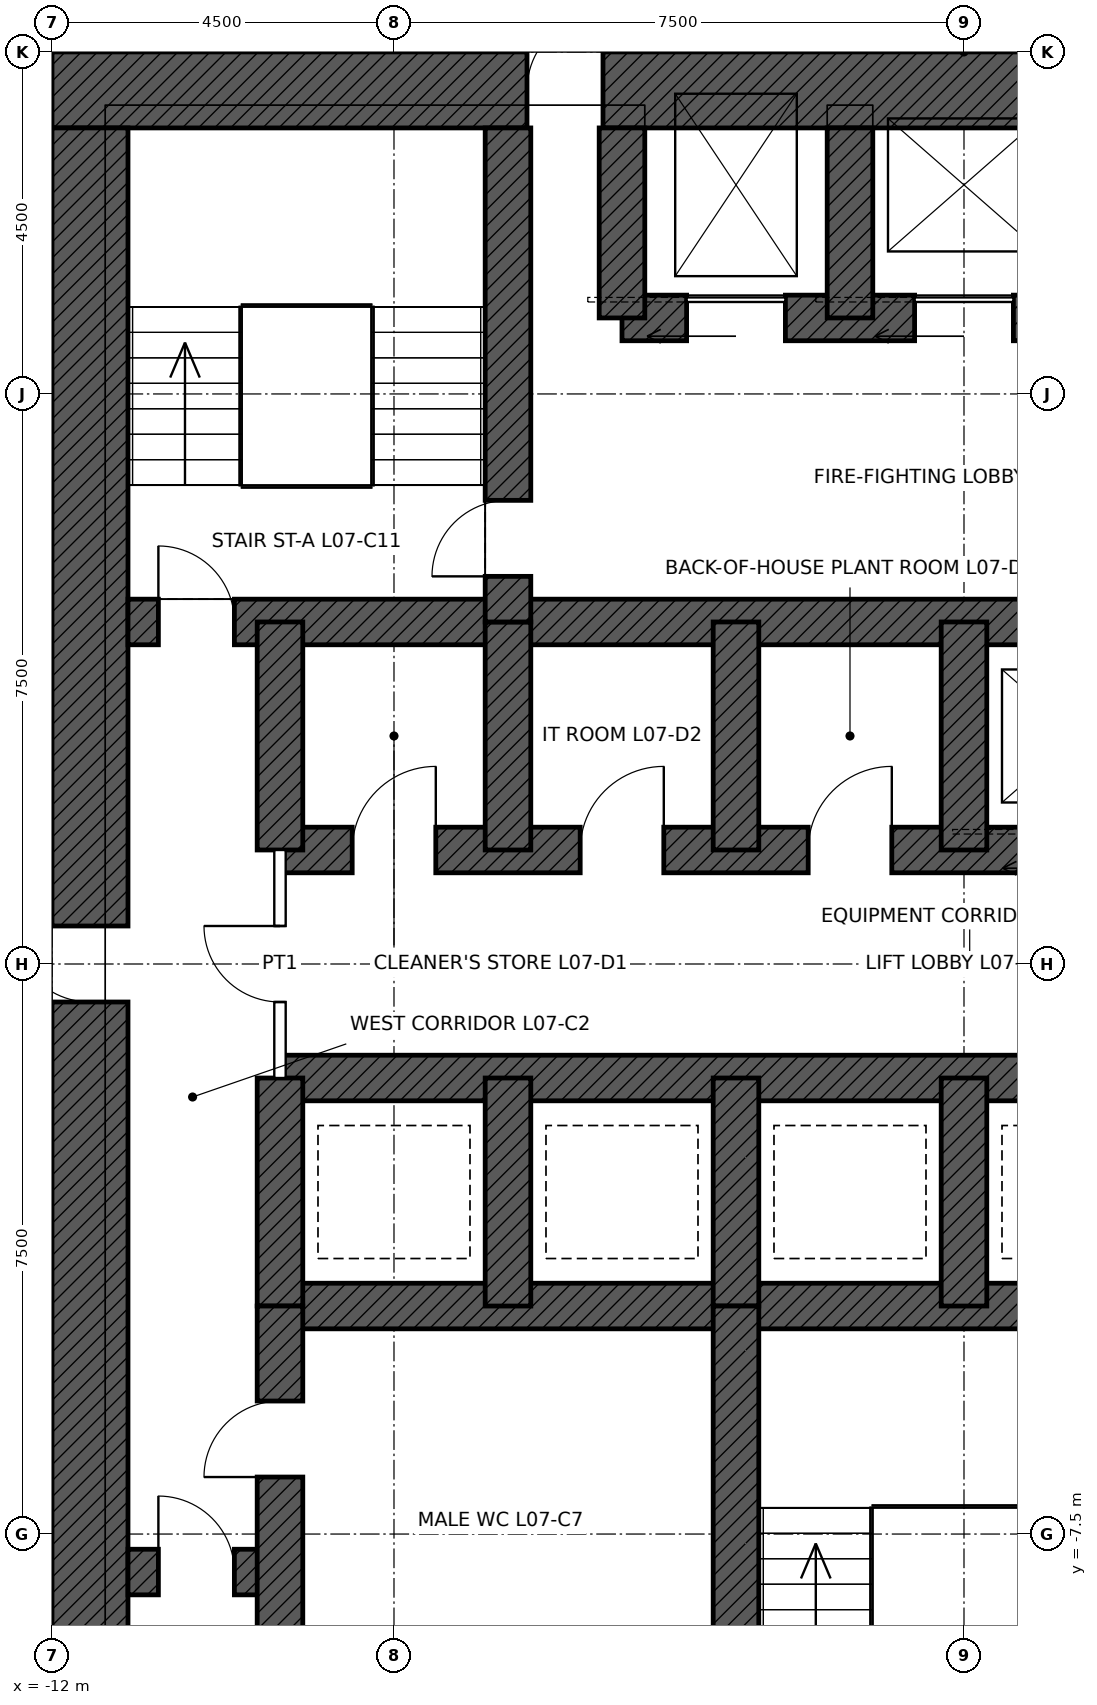
"""IFC4 building model, lengths in metres.
Left out: names, types, materials, properties, quantities, classifications, styles, units other than length and angle.
Written with IfcOpenShell. Run it as: python <this file> out.ifc"""

import sys

from ifc_helpers import new_model, si_unit, direction, frame, frame_2d, origin, place, context, subcontext, project, spatial, rectangle, extrude, element, fill, save


model = new_model("IFC4")
c1 = context("Model", 3, precision=1e-05, world=origin(), true_north=direction((0.0, 1.0)))
c2 = subcontext(c1, "Body", "Model", "MODEL_VIEW")
j1 = project(units=[si_unit("LENGTHUNIT", "METRE"), si_unit("PLANEANGLEUNIT", "RADIAN")], contexts=[c1])
p1 = place(None, origin())
s1 = spatial("IfcSite", under=j1, at=p1, CompositionType="ELEMENT")
p2 = place(p1, origin())
s2 = spatial("IfcBuilding", under=s1, at=p2, CompositionType="ELEMENT")
p3 = place(p2, frame((0.0, 0.0, 38.4)))
s3 = spatial("IfcBuildingStorey", under=s2, at=p3, CompositionType="ELEMENT", Elevation=38.4)
p4 = place(p3, frame((-12.0, 11.5, 0.0), z_axis=(0.0, 0.0, 1.0), x_axis=(1.0, 0.0, 0.0)))
e1 = element("IfcWall", 1, at=p4, inside=s3, PredefinedType="SHEAR", context=c2, shape_type="SweptSolid", body=[
    extrude(rectangle(XDim=24.0, YDim=1.0, at=frame_2d((12.0, 0.0))), origin(), (0.0, 0.0, 1.0), 5.0),
])
p5 = place(p4, frame((6.25, 0.0, 0.0)))
e2 = element("IfcOpeningElement", 2, at=p5, cuts=e1, PredefinedType="OPENING", context=c2, shape_type="SweptSolid", body=[
    extrude(rectangle(XDim=1.0, YDim=2.4, at=frame_2d((0.5, 1.2))), frame((0.0, 0.51, 0.0), z_axis=(0.0, -1.0, 0.0), x_axis=(1.0, 0.0, 0.0)), (0.0, 0.0, 1.0), 1.02),
])
p6 = place(p4, frame((16.75, 0.0, 0.0)))
e3 = element("IfcOpeningElement", 3, at=p6, cuts=e1, PredefinedType="OPENING", context=c2, shape_type="SweptSolid", body=[
    extrude(rectangle(XDim=1.0, YDim=2.4, at=frame_2d((0.5, 1.2))), frame((0.0, 0.51, 0.0), z_axis=(0.0, -1.0, 0.0), x_axis=(1.0, 0.0, 0.0)), (0.0, 0.0, 1.0), 1.02),
])
p7 = place(p3, frame((-11.5, -11.0, 0.0), z_axis=(0.0, 0.0, 1.0), x_axis=(0.0, 1.0, 0.0)))
e4 = element("IfcWall", 4, at=p7, inside=s3, PredefinedType="SHEAR", context=c2, shape_type="SweptSolid", body=[
    extrude(rectangle(XDim=22.0, YDim=1.0, at=frame_2d((11.0, 0.0))), origin(), (0.0, 0.0, 1.0), 5.0),
])
p8 = place(p7, frame((10.5, 0.0, 0.0)))
e5 = element("IfcOpeningElement", 5, at=p8, cuts=e4, PredefinedType="OPENING", context=c2, shape_type="SweptSolid", body=[
    extrude(rectangle(XDim=1.0, YDim=2.4, at=frame_2d((0.5, 1.2))), frame((0.0, 0.51, 0.0), z_axis=(0.0, -1.0, 0.0), x_axis=(1.0, 0.0, 0.0)), (0.0, 0.0, 1.0), 1.02),
])
p9 = place(p3, frame((-11.0, 4.5, 0.0), z_axis=(0.0, 0.0, 1.0), x_axis=(1.0, 0.0, 0.0)))
e6 = element("IfcWall", 6, at=p9, inside=s3, PredefinedType="SHEAR", context=c2, shape_type="SweptSolid", body=[
    extrude(rectangle(XDim=22.0, YDim=0.6, at=frame_2d((11.0, 0.0))), origin(), (0.0, 0.0, 1.0), 5.0),
])
p10 = place(p9, frame((0.4, 0.0, 0.0)))
e7 = element("IfcOpeningElement", 7, at=p10, cuts=e6, PredefinedType="OPENING", context=c2, shape_type="SweptSolid", body=[
    extrude(rectangle(XDim=1.0, YDim=2.1, at=frame_2d((0.5, 1.05))), frame((0.0, 0.31, 0.0), z_axis=(0.0, -1.0, 0.0), x_axis=(1.0, 0.0, 0.0)), (0.0, 0.0, 1.0), 0.62),
])
p11 = place(p9, frame((20.6, 0.0, 0.0)))
e8 = element("IfcOpeningElement", 8, at=p11, cuts=e6, PredefinedType="OPENING", context=c2, shape_type="SweptSolid", body=[
    extrude(rectangle(XDim=1.0, YDim=2.1, at=frame_2d((0.5, 1.05))), frame((0.0, 0.31, 0.0), z_axis=(0.0, -1.0, 0.0), x_axis=(1.0, 0.0, 0.0)), (0.0, 0.0, 1.0), 0.62),
])
p12 = place(p3, frame((-9.0, 1.5, 0.0), z_axis=(0.0, 0.0, 1.0), x_axis=(1.0, 0.0, 0.0)))
e9 = element("IfcWall", 9, at=p12, inside=s3, PredefinedType="SHEAR", context=c2, shape_type="SweptSolid", body=[
    extrude(rectangle(XDim=18.0, YDim=0.6, at=frame_2d((9.0, 0.0))), origin(), (0.0, 0.0, 1.0), 5.0),
])
p13 = place(p12, frame((9.95, 0.0, 0.0)))
e10 = element("IfcOpeningElement", 10, at=p13, cuts=e9, PredefinedType="OPENING", context=c2, shape_type="SweptSolid", body=[
    extrude(rectangle(XDim=1.1, YDim=2.1, at=frame_2d((0.55, 1.05))), frame((0.0, 0.31, 0.0), z_axis=(0.0, -1.0, 0.0), x_axis=(1.0, 0.0, 0.0)), (0.0, 0.0, 1.0), 0.62),
])
p14 = place(p12, frame((12.95, 0.0, 0.0)))
e11 = element("IfcOpeningElement", 11, at=p14, cuts=e9, PredefinedType="OPENING", context=c2, shape_type="SweptSolid", body=[
    extrude(rectangle(XDim=1.1, YDim=2.1, at=frame_2d((0.55, 1.05))), frame((0.0, 0.31, 0.0), z_axis=(0.0, -1.0, 0.0), x_axis=(1.0, 0.0, 0.0)), (0.0, 0.0, 1.0), 0.62),
])
p15 = place(p12, frame((15.95, 0.0, 0.0)))
e12 = element("IfcOpeningElement", 12, at=p15, cuts=e9, PredefinedType="OPENING", context=c2, shape_type="SweptSolid", body=[
    extrude(rectangle(XDim=1.1, YDim=2.1, at=frame_2d((0.55, 1.05))), frame((0.0, 0.31, 0.0), z_axis=(0.0, -1.0, 0.0), x_axis=(1.0, 0.0, 0.0)), (0.0, 0.0, 1.0), 0.62),
])
p16 = place(p12, frame((0.95, 0.0, 0.0)))
e13 = element("IfcOpeningElement", 13, at=p16, cuts=e9, PredefinedType="OPENING", context=c2, shape_type="SweptSolid", body=[
    extrude(rectangle(XDim=1.1, YDim=2.1, at=frame_2d((0.55, 1.05))), frame((0.0, 0.31, 0.0), z_axis=(0.0, -1.0, 0.0), x_axis=(1.0, 0.0, 0.0)), (0.0, 0.0, 1.0), 0.62),
])
p17 = place(p12, frame((3.95, 0.0, 0.0)))
e14 = element("IfcOpeningElement", 14, at=p17, cuts=e9, PredefinedType="OPENING", context=c2, shape_type="SweptSolid", body=[
    extrude(rectangle(XDim=1.1, YDim=2.1, at=frame_2d((0.55, 1.05))), frame((0.0, 0.31, 0.0), z_axis=(0.0, -1.0, 0.0), x_axis=(1.0, 0.0, 0.0)), (0.0, 0.0, 1.0), 0.62),
])
p18 = place(p12, frame((6.95, 0.0, 0.0)))
e15 = element("IfcOpeningElement", 15, at=p18, cuts=e9, PredefinedType="OPENING", context=c2, shape_type="SweptSolid", body=[
    extrude(rectangle(XDim=1.1, YDim=2.1, at=frame_2d((0.55, 1.05))), frame((0.0, 0.31, 0.0), z_axis=(0.0, -1.0, 0.0), x_axis=(1.0, 0.0, 0.0)), (0.0, 0.0, 1.0), 0.62),
])
for number, where, z_axis, x_axis in (
    (16, (-9.0, -1.5, 0.0), (0.0, 0.0, 1.0), (1.0, 0.0, 0.0)),
    (17, (-9.0, -4.5, 0.0), (0.0, 0.0, 1.0), (1.0, 0.0, 0.0)),
):
    element("IfcWall", number, at=place(p3, frame(where, z_axis=z_axis, x_axis=x_axis)), inside=s3, PredefinedType="SHEAR", context=c2, shape_type="SweptSolid", body=[
        extrude(rectangle(XDim=18.0, YDim=0.6, at=frame_2d((9.0, 0.0))), origin(), (0.0, 0.0, 1.0), 5.0),
    ])
p19 = place(p3, frame((-4.5, 8.5, 0.0), z_axis=(0.0, 0.0, 1.0), x_axis=(1.0, 0.0, 0.0)))
e18 = element("IfcWall", 18, at=p19, inside=s3, PredefinedType="SHEAR", context=c2, shape_type="SweptSolid", body=[
    extrude(rectangle(XDim=9.0, YDim=0.6, at=frame_2d((4.5, 0.0))), origin(), (0.0, 0.0, 1.0), 5.0),
])
p20 = place(p19, frame((0.85, 0.0, 0.0)))
e19 = element("IfcOpeningElement", 19, at=p20, cuts=e18, PredefinedType="OPENING", context=c2, shape_type="SweptSolid", body=[
    extrude(rectangle(XDim=1.3, YDim=2.4, at=frame_2d((0.65, 1.2))), frame((0.0, 0.31, 0.0), z_axis=(0.0, -1.0, 0.0), x_axis=(1.0, 0.0, 0.0)), (0.0, 0.0, 1.0), 0.62),
])
p21 = place(p19, frame((6.85, 0.0, 0.0)))
e20 = element("IfcOpeningElement", 20, at=p21, cuts=e18, PredefinedType="OPENING", context=c2, shape_type="SweptSolid", body=[
    extrude(rectangle(XDim=1.3, YDim=2.4, at=frame_2d((0.65, 1.2))), frame((0.0, 0.31, 0.0), z_axis=(0.0, -1.0, 0.0), x_axis=(1.0, 0.0, 0.0)), (0.0, 0.0, 1.0), 0.62),
])
p22 = place(p19, frame((3.85, 0.0, 0.0)))
e21 = element("IfcOpeningElement", 21, at=p22, cuts=e18, PredefinedType="OPENING", context=c2, shape_type="SweptSolid", body=[
    extrude(rectangle(XDim=1.3, YDim=2.4, at=frame_2d((0.65, 1.2))), frame((0.0, 0.31, 0.0), z_axis=(0.0, -1.0, 0.0), x_axis=(1.0, 0.0, 0.0)), (0.0, 0.0, 1.0), 0.62),
])
p23 = place(p3, frame((-11.0, -8.0, 0.0), z_axis=(0.0, 0.0, 1.0), x_axis=(1.0, 0.0, 0.0)))
e22 = element("IfcWall", 22, at=p23, inside=s3, PredefinedType="SHEAR", context=c2, shape_type="SweptSolid", body=[
    extrude(rectangle(XDim=2.0, YDim=0.6, at=frame_2d((1.0, 0.0))), origin(), (0.0, 0.0, 1.0), 5.0),
])
p24 = place(p23, frame((0.4, 0.0, 0.0)))
e23 = element("IfcOpeningElement", 23, at=p24, cuts=e22, PredefinedType="OPENING", context=c2, shape_type="SweptSolid", body=[
    extrude(rectangle(XDim=1.0, YDim=2.1, at=frame_2d((0.5, 1.05))), frame((0.0, 0.31, 0.0), z_axis=(0.0, -1.0, 0.0), x_axis=(1.0, 0.0, 0.0)), (0.0, 0.0, 1.0), 0.62),
])
for number, where, z_axis, x_axis in (
    (24, (-9.0, 1.5, 0.0), (0.0, 0.0, 1.0), (0.0, 1.0, 0.0)),
    (25, (-9.0, -4.5, 0.0), (0.0, 0.0, 1.0), (0.0, 1.0, 0.0)),
    (26, (-6.0, 1.5, 0.0), (0.0, 0.0, 1.0), (0.0, 1.0, 0.0)),
    (27, (-3.0, 1.5, 0.0), (0.0, 0.0, 1.0), (0.0, 1.0, 0.0)),
    (28, (0.0, 1.5, 0.0), (0.0, 0.0, 1.0), (0.0, 1.0, 0.0)),
    (29, (-6.0, -4.5, 0.0), (0.0, 0.0, 1.0), (0.0, 1.0, 0.0)),
    (30, (-3.0, -4.5, 0.0), (0.0, 0.0, 1.0), (0.0, 1.0, 0.0)),
    (31, (0.0, -4.5, 0.0), (0.0, 0.0, 1.0), (0.0, 1.0, 0.0)),
):
    element("IfcWall", number, at=place(p3, frame(where, z_axis=z_axis, x_axis=x_axis)), inside=s3, PredefinedType="SHEAR", context=c2, shape_type="SweptSolid", body=[
        extrude(rectangle(XDim=3.0, YDim=0.6, at=frame_2d((1.5, 0.0))), origin(), (0.0, 0.0, 1.0), 5.0),
    ])
p25 = place(p3, frame((-6.0, 4.5, 0.0), z_axis=(0.0, 0.0, 1.0), x_axis=(0.0, 1.0, 0.0)))
e32 = element("IfcWall", 32, at=p25, inside=s3, PredefinedType="SHEAR", context=c2, shape_type="SweptSolid", body=[
    extrude(rectangle(XDim=6.5, YDim=0.6, at=frame_2d((3.25, 0.0))), origin(), (0.0, 0.0, 1.0), 5.0),
])
p26 = place(p25, frame((0.6, 0.0, 0.0)))
e33 = element("IfcOpeningElement", 33, at=p26, cuts=e32, PredefinedType="OPENING", context=c2, shape_type="SweptSolid", body=[
    extrude(rectangle(XDim=1.0, YDim=2.1, at=frame_2d((0.5, 1.05))), frame((0.0, 0.31, 0.0), z_axis=(0.0, -1.0, 0.0), x_axis=(1.0, 0.0, 0.0)), (0.0, 0.0, 1.0), 0.62),
])
for number, where, z_axis, x_axis in (
    (34, (-4.5, 8.5, 0.0), (0.0, 0.0, 1.0), (0.0, 1.0, 0.0)),
    (35, (-1.5, 8.5, 0.0), (0.0, 0.0, 1.0), (0.0, 1.0, 0.0)),
):
    element("IfcWall", number, at=place(p3, frame(where, z_axis=z_axis, x_axis=x_axis)), inside=s3, PredefinedType="SHEAR", context=c2, shape_type="SweptSolid", body=[
        extrude(rectangle(XDim=2.5, YDim=0.6, at=frame_2d((1.25, 0.0))), origin(), (0.0, 0.0, 1.0), 5.0),
    ])
p27 = place(p3, frame((-9.0, -11.0, 0.0), z_axis=(0.0, 0.0, 1.0), x_axis=(0.0, 1.0, 0.0)))
e36 = element("IfcWall", 36, at=p27, inside=s3, PredefinedType="SHEAR", context=c2, shape_type="SweptSolid", body=[
    extrude(rectangle(XDim=6.5, YDim=0.6, at=frame_2d((3.25, 0.0))), origin(), (0.0, 0.0, 1.0), 5.0),
])
p28 = place(p27, frame((4.25, 0.0, 0.0)))
e37 = element("IfcOpeningElement", 37, at=p28, cuts=e36, PredefinedType="OPENING", context=c2, shape_type="SweptSolid", body=[
    extrude(rectangle(XDim=1.0, YDim=2.1, at=frame_2d((0.5, 1.05))), frame((0.0, 0.31, 0.0), z_axis=(0.0, -1.0, 0.0), x_axis=(1.0, 0.0, 0.0)), (0.0, 0.0, 1.0), 0.62),
])
p29 = place(p3, frame((-3.0, -11.0, 0.0), z_axis=(0.0, 0.0, 1.0), x_axis=(0.0, 1.0, 0.0)))
e38 = element("IfcWall", 38, at=p29, inside=s3, PredefinedType="SHEAR", context=c2, shape_type="SweptSolid", body=[
    extrude(rectangle(XDim=6.5, YDim=0.6, at=frame_2d((3.25, 0.0))), origin(), (0.0, 0.0, 1.0), 5.0),
])
p30 = place(p3, frame((-9.0, -1.5, 0.0), z_axis=(0.0, 0.0, 1.0), x_axis=(0.0, 1.0, 0.0)))
e39 = element("IfcWall", 39, at=p30, inside=s3, PredefinedType="PARTITIONING", context=c2, shape_type="SweptSolid", body=[
    extrude(rectangle(XDim=3.0, YDim=0.15, at=frame_2d((1.5, 0.0))), origin(), (0.0, 0.0, 1.0), 4.75),
])
p31 = place(p30, frame((1.0, 0.0, 0.0)))
e40 = element("IfcOpeningElement", 40, at=p31, cuts=e39, PredefinedType="OPENING", context=c2, shape_type="SweptSolid", body=[
    extrude(rectangle(XDim=1.0, YDim=2.4, at=frame_2d((0.5, 1.2))), frame((0.0, 0.085, 0.0), z_axis=(0.0, -1.0, 0.0), x_axis=(1.0, 0.0, 0.0)), (0.0, 0.0, 1.0), 0.17),
])
p32 = place(p10, origin())
e41 = element("IfcDoor", 41, at=p32, inside=s3, OperationType="SINGLE_SWING_LEFT", PredefinedType="DOOR", context=c2, shape_type="SweptSolid", body=[
    extrude(rectangle(XDim=1.0, YDim=2.1, at=frame_2d((0.5, 1.05))), frame((0.0, 0.025, 0.0), z_axis=(0.0, -1.0, 0.0), x_axis=(1.0, 0.0, 0.0)), (0.0, 0.0, 1.0), 0.05),
])
fill(e7, e41)
p33 = place(p26, origin())
e42 = element("IfcDoor", 42, at=p33, inside=s3, OperationType="SINGLE_SWING_LEFT", PredefinedType="DOOR", context=c2, shape_type="SweptSolid", body=[
    extrude(rectangle(XDim=1.0, YDim=2.1, at=frame_2d((0.5, 1.05))), frame((0.0, 0.025, 0.0), z_axis=(0.0, -1.0, 0.0), x_axis=(1.0, 0.0, 0.0)), (0.0, 0.0, 1.0), 0.05),
])
fill(e33, e42)
p34 = place(p5, origin())
e43 = element("IfcDoor", 43, at=p34, inside=s3, OperationType="SINGLE_SWING_RIGHT", PredefinedType="DOOR", context=c2, shape_type="SweptSolid", body=[
    extrude(rectangle(XDim=1.0, YDim=2.4, at=frame_2d((0.5, 1.2))), frame((0.0, 0.485, 0.0), z_axis=(0.0, -1.0, 0.0), x_axis=(1.0, 0.0, 0.0)), (0.0, 0.0, 1.0), 0.05),
])
fill(e2, e43)
p35 = place(p8, origin())
e44 = element("IfcDoor", 44, at=p35, inside=s3, OperationType="SINGLE_SWING_RIGHT", PredefinedType="DOOR", context=c2, shape_type="SweptSolid", body=[
    extrude(rectangle(XDim=1.0, YDim=2.4, at=frame_2d((0.5, 1.2))), frame((0.0, 0.485, 0.0), z_axis=(0.0, -1.0, 0.0), x_axis=(1.0, 0.0, 0.0)), (0.0, 0.0, 1.0), 0.05),
])
fill(e5, e44)
p36 = place(p28, origin())
e45 = element("IfcDoor", 45, at=p36, inside=s3, OperationType="SINGLE_SWING_LEFT", PredefinedType="DOOR", context=c2, shape_type="SweptSolid", body=[
    extrude(rectangle(XDim=1.0, YDim=2.1, at=frame_2d((0.5, 1.05))), frame((0.0, 0.025, 0.0), z_axis=(0.0, -1.0, 0.0), x_axis=(1.0, 0.0, 0.0)), (0.0, 0.0, 1.0), 0.05),
])
fill(e37, e45)
p37 = place(p24, origin())
e46 = element("IfcDoor", 46, at=p37, inside=s3, OperationType="SINGLE_SWING_LEFT", PredefinedType="DOOR", context=c2, shape_type="SweptSolid", body=[
    extrude(rectangle(XDim=1.0, YDim=2.1, at=frame_2d((0.5, 1.05))), frame((0.0, 0.025, 0.0), z_axis=(0.0, -1.0, 0.0), x_axis=(1.0, 0.0, 0.0)), (0.0, 0.0, 1.0), 0.05),
])
fill(e23, e46)
p38 = place(p20, origin())
e47 = element("IfcDoor", 47, at=p38, inside=s3, OperationType="SLIDING_TO_LEFT", PredefinedType="DOOR", context=c2, shape_type="SweptSolid", body=[
    extrude(rectangle(XDim=1.3, YDim=2.4, at=frame_2d((0.65, 1.2))), frame((0.0, 0.025, 0.0), z_axis=(0.0, -1.0, 0.0), x_axis=(1.0, 0.0, 0.0)), (0.0, 0.0, 1.0), 0.05),
])
fill(e19, e47)
p39 = place(p22, origin())
e48 = element("IfcDoor", 48, at=p39, inside=s3, OperationType="SLIDING_TO_LEFT", PredefinedType="DOOR", context=c2, shape_type="SweptSolid", body=[
    extrude(rectangle(XDim=1.3, YDim=2.4, at=frame_2d((0.65, 1.2))), frame((0.0, 0.025, 0.0), z_axis=(0.0, -1.0, 0.0), x_axis=(1.0, 0.0, 0.0)), (0.0, 0.0, 1.0), 0.05),
])
fill(e21, e48)
p40 = place(p31, origin())
e49 = element("IfcDoor", 49, at=p40, inside=s3, OperationType="SINGLE_SWING_RIGHT", PredefinedType="DOOR", context=c2, shape_type="SweptSolid", body=[
    extrude(rectangle(XDim=1.0, YDim=2.4, at=frame_2d((0.5, 1.2))), frame((0.0, 0.025, 0.0), z_axis=(0.0, -1.0, 0.0), x_axis=(1.0, 0.0, 0.0)), (0.0, 0.0, 1.0), 0.05),
])
fill(e40, e49)
p41 = place(p16, origin())
e50 = element("IfcDoor", 50, at=p41, inside=s3, OperationType="SINGLE_SWING_RIGHT", PredefinedType="DOOR", context=c2, shape_type="SweptSolid", body=[
    extrude(rectangle(XDim=1.1, YDim=2.1, at=frame_2d((0.55, 1.05))), frame((0.0, 0.025, 0.0), z_axis=(0.0, -1.0, 0.0), x_axis=(1.0, 0.0, 0.0)), (0.0, 0.0, 1.0), 0.05),
])
fill(e13, e50)
p42 = place(p17, origin())
e51 = element("IfcDoor", 51, at=p42, inside=s3, OperationType="SINGLE_SWING_RIGHT", PredefinedType="DOOR", context=c2, shape_type="SweptSolid", body=[
    extrude(rectangle(XDim=1.1, YDim=2.1, at=frame_2d((0.55, 1.05))), frame((0.0, 0.025, 0.0), z_axis=(0.0, -1.0, 0.0), x_axis=(1.0, 0.0, 0.0)), (0.0, 0.0, 1.0), 0.05),
])
fill(e14, e51)
p43 = place(p18, origin())
e52 = element("IfcDoor", 52, at=p43, inside=s3, OperationType="SINGLE_SWING_RIGHT", PredefinedType="DOOR", context=c2, shape_type="SweptSolid", body=[
    extrude(rectangle(XDim=1.1, YDim=2.1, at=frame_2d((0.55, 1.05))), frame((0.0, 0.025, 0.0), z_axis=(0.0, -1.0, 0.0), x_axis=(1.0, 0.0, 0.0)), (0.0, 0.0, 1.0), 0.05),
])
fill(e15, e52)
save(model, sys.argv[1])
